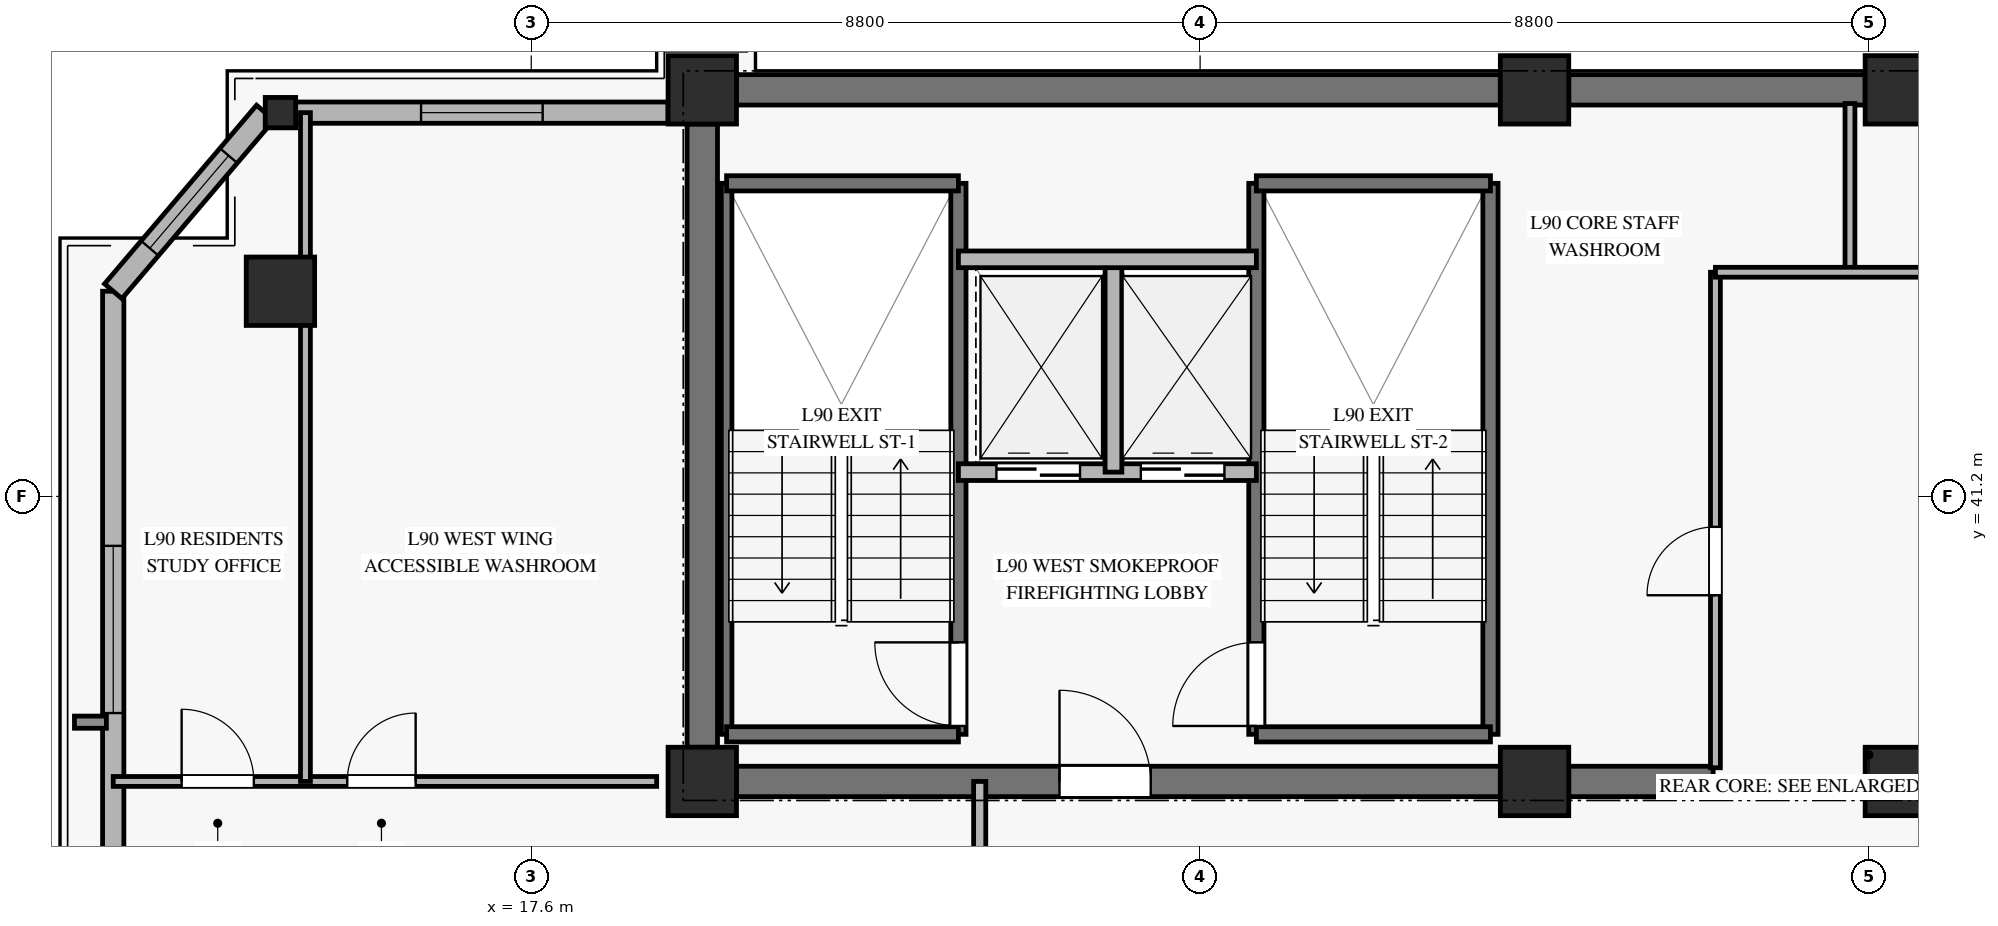
"""IFC4 building model, lengths in metres.
Left out: names, types, materials, properties, quantities, classifications, styles, units other than length and angle.
Written with IfcOpenShell. Run it as: python <this file> out.ifc"""

import sys

from ifc_helpers import new_model, si_unit, direction, frame, frame_2d, origin, origin_2d, place, context, subcontext, project, spatial, rectangle, hollow_rectangle, extrude, source, transform, mapped, element, fill, save


model = new_model("IFC4")
c1 = context("Model", 3, precision=1e-05, world=origin(), true_north=direction((0.0, 1.0)))
c2 = subcontext(c1, "Body", "Model", "MODEL_VIEW")
j1 = project(units=[si_unit("LENGTHUNIT", "METRE"), si_unit("PLANEANGLEUNIT", "RADIAN")], contexts=[c1])
p1 = place(None, origin())
s1 = spatial("IfcSite", under=j1, at=p1, CompositionType="ELEMENT")
p2 = place(p1, origin())
s2 = spatial("IfcBuilding", under=s1, at=p2, CompositionType="ELEMENT")
p3 = place(p2, frame((0.0, 0.0, 345.9)))
s3 = spatial("IfcBuildingStorey", under=s2, at=p3, CompositionType="ELEMENT", Elevation=345.9)
m1 = source(origin(), c2, "Body", "SweptSolid", [
    extrude(rectangle(XDim=0.9, YDim=0.9, at=origin_2d()), origin(), (0.0, 0.0, 1.0), 3.185),
])
for number, where, z_axis, x_axis in (
    (1, (19.85, 37.45, 0.0), (0.0, 0.0, 1.0), (1.0, 0.0, 0.0)),
    (2, (19.85, 46.55, 0.0), (0.0, 0.0, 1.0), (1.0, 0.0, 0.0)),
    (3, (30.8, 37.45, 0.0), (0.0, 0.0, 1.0), (1.0, 0.0, 0.0)),
    (4, (30.8, 46.55, 0.0), (0.0, 0.0, 1.0), (1.0, 0.0, 0.0)),
    (5, (35.6, 37.45, 0.0), (0.0, 0.0, 1.0), (1.0, 0.0, 0.0)),
    (6, (35.6, 46.55, 0.0), (0.0, 0.0, 1.0), (1.0, 0.0, 0.0)),
):
    element("IfcColumn", number, at=place(p3, frame(where, z_axis=z_axis, x_axis=x_axis)), inside=s3, PredefinedType="PILASTER", context=c2, shape_type="MappedRepresentation", body=[
        mapped(m1, transform((0.0, 0.0, 0.0), x_axis=(1.0, 0.0, 0.0), y_axis=(0.0, 1.0, 0.0), z_axis=(0.0, 0.0, 1.0), scale=1.0)),
    ])
p4 = place(p3, frame((20.3, 46.55, 0.0), z_axis=(0.0, 0.0, 1.0), x_axis=(1.0, 0.0, 0.0)))
e7 = element("IfcWall", 7, at=p4, inside=s3, PredefinedType="SHEAR", context=c2, shape_type="SweptSolid", body=[
    extrude(rectangle(XDim=10.05, YDim=0.4, at=frame_2d((5.025, 0.0))), origin(), (0.0, 0.0, 1.0), 3.185),
])
p5 = place(p3, frame((31.25, 46.55, 0.0), z_axis=(0.0, 0.0, 1.0), x_axis=(1.0, 0.0, 0.0)))
e8 = element("IfcWall", 8, at=p5, inside=s3, PredefinedType="SHEAR", context=c2, shape_type="SweptSolid", body=[
    extrude(rectangle(XDim=3.9, YDim=0.4, at=frame_2d((1.95, 0.0))), origin(), (0.0, 0.0, 1.0), 3.185),
])
p6 = place(p3, frame((20.3, 37.45, 0.0), z_axis=(0.0, 0.0, 1.0), x_axis=(1.0, 0.0, 0.0)))
e9 = element("IfcWall", 9, at=p6, inside=s3, PredefinedType="SHEAR", context=c2, shape_type="SweptSolid", body=[
    extrude(rectangle(XDim=10.05, YDim=0.4, at=frame_2d((5.025, 0.0))), origin(), (0.0, 0.0, 1.0), 3.185),
])
p7 = place(p6, frame((4.25, 0.0, 0.0)))
e10 = element("IfcOpeningElement", 10, at=p7, cuts=e9, PredefinedType="OPENING", context=c2, shape_type="SweptSolid", body=[
    extrude(rectangle(XDim=1.2, YDim=2.15, at=frame_2d((0.6, 1.075))), frame((0.0, 0.21, 0.0), z_axis=(0.0, -1.0, 0.0), x_axis=(1.0, 0.0, 0.0)), (0.0, 0.0, 1.0), 0.42),
])
p8 = place(p3, frame((31.25, 37.45, 0.0), z_axis=(0.0, 0.0, 1.0), x_axis=(1.0, 0.0, 0.0)))
e11 = element("IfcWall", 11, at=p8, inside=s3, PredefinedType="SHEAR", context=c2, shape_type="SweptSolid", body=[
    extrude(rectangle(XDim=1.9, YDim=0.4, at=frame_2d((0.95, 0.0))), origin(), (0.0, 0.0, 1.0), 3.185),
])
p9 = place(p3, frame((19.85, 37.9, 0.0), z_axis=(0.0, 0.0, 1.0), x_axis=(0.0, 1.0, 0.0)))
e12 = element("IfcWall", 12, at=p9, inside=s3, PredefinedType="SHEAR", context=c2, shape_type="SweptSolid", body=[
    extrude(rectangle(XDim=8.2, YDim=0.4, at=frame_2d((4.1, 0.0))), origin(), (0.0, 0.0, 1.0), 3.185),
])
m2 = source(origin(), c2, "Body", "SweptSolid", [
    extrude(hollow_rectangle(XDim=0.9, YDim=0.9, WallThickness=0.04, at=origin_2d()), origin(), (0.0, 0.0, 1.0), 3.185),
])
p10 = place(p3, frame((14.3, 43.9, 0.0), z_axis=(0.0, 0.0, 1.0), x_axis=(1.0, 0.0, 0.0)))
e13 = element("IfcColumn", 13, at=p10, inside=s3, PredefinedType="COLUMN", context=c2, shape_type="MappedRepresentation", body=[
    mapped(m2, transform((0.0, 0.0, 0.0), x_axis=(1.0, 0.0, 0.0), y_axis=(0.0, 1.0, 0.0), z_axis=(0.0, 0.0, 1.0), scale=1.0)),
])
m3 = source(origin(), c2, "Body", "SweptSolid", [
    extrude(hollow_rectangle(XDim=0.4, YDim=0.4, WallThickness=0.02, at=origin_2d()), origin(), (0.0, 0.0, 1.0), 3.185),
])
p11 = place(p3, frame((14.3, 46.25, 0.0), z_axis=(0.0, 0.0, 1.0), x_axis=(1.0, 0.0, 0.0)))
e14 = element("IfcColumn", 14, at=p11, inside=s3, PredefinedType="COLUMN", context=c2, shape_type="MappedRepresentation", body=[
    mapped(m3, transform((0.0, 0.0, 0.0), x_axis=(1.0, 0.0, 0.0), y_axis=(0.0, 1.0, 0.0), z_axis=(0.0, 0.0, 1.0), scale=1.0)),
])
p12 = place(p3, frame((12.1, 35.0, 0.0), z_axis=(0.0, 0.0, 1.0), x_axis=(0.0, 1.0, 0.0)))
e15 = element("IfcWall", 15, at=p12, inside=s3, PredefinedType="SOLIDWALL", context=c2, shape_type="SweptSolid", body=[
    extrude(rectangle(XDim=8.9, YDim=0.28, at=frame_2d((4.45, 0.0))), origin(), (0.0, 0.0, 1.0), 2.815),
])
p13 = place(p12, frame((3.35, 0.0, 0.45)))
e16 = element("IfcOpeningElement", 16, at=p13, cuts=e15, PredefinedType="OPENING", context=c2, shape_type="SweptSolid", body=[
    extrude(rectangle(XDim=2.2, YDim=2.1, at=frame_2d((1.1, 1.05))), frame((0.0, 0.15, 0.0), z_axis=(0.0, -1.0, 0.0), x_axis=(1.0, 0.0, 0.0)), (0.0, 0.0, 1.0), 0.3),
])
p14 = place(p3, frame((14.5, 46.25, 0.0), z_axis=(0.0, 0.0, 1.0), x_axis=(1.0, 0.0, 0.0)))
e17 = element("IfcWall", 17, at=p14, inside=s3, PredefinedType="SOLIDWALL", context=c2, shape_type="SweptSolid", body=[
    extrude(rectangle(XDim=4.9, YDim=0.28, at=frame_2d((2.45, 0.0))), origin(), (0.0, 0.0, 1.0), 2.815),
])
p15 = place(p14, frame((1.65, 0.0, 0.45)))
e18 = element("IfcOpeningElement", 18, at=p15, cuts=e17, PredefinedType="OPENING", context=c2, shape_type="SweptSolid", body=[
    extrude(rectangle(XDim=1.6, YDim=2.0, at=frame_2d((0.8, 1.0))), frame((0.0, 0.15, 0.0), z_axis=(0.0, -1.0, 0.0), x_axis=(1.0, 0.0, 0.0)), (0.0, 0.0, 1.0), 0.3),
])
p16 = place(p3, frame((14.1, 46.25, 0.0), z_axis=(0.0, 0.0, 1.0), x_axis=(-0.648103010114, -0.761552682538, 0.0)))
e19 = element("IfcWall", 19, at=p16, inside=s3, PredefinedType="SOLIDWALL", context=c2, shape_type="SweptSolid", body=[
    extrude(rectangle(XDim=3.086, YDim=0.3, at=frame_2d((1.543, 0.0))), origin(), (0.0, 0.0, 1.0), 2.815),
])
p17 = place(p16, frame((0.743, 0.0, 0.45)))
e20 = element("IfcOpeningElement", 20, at=p17, cuts=e19, PredefinedType="OPENING", context=c2, shape_type="SweptSolid", body=[
    extrude(rectangle(XDim=1.6, YDim=2.0, at=frame_2d((0.8, 1.0))), frame((0.0, 0.16, 0.0), z_axis=(0.0, -1.0, 0.0), x_axis=(1.0, 0.0, 0.0)), (0.0, 0.0, 1.0), 0.32),
])
p18 = place(p3, frame((20.17, 38.07, 0.0), z_axis=(0.0, 0.0, 1.0), x_axis=(0.0, 1.0, 0.0)))
e21 = element("IfcWall", 21, at=p18, inside=s3, PredefinedType="SOLIDWALL", context=c2, shape_type="SweptSolid", body=[
    extrude(rectangle(XDim=7.25, YDim=0.14, at=frame_2d((3.625, 0.0))), origin(), (0.0, 0.0, 1.0), 3.4),
])
p19 = place(p3, frame((23.22, 38.07, 0.0), z_axis=(0.0, 0.0, 1.0), x_axis=(0.0, 1.0, 0.0)))
e22 = element("IfcWall", 22, at=p19, inside=s3, PredefinedType="SOLIDWALL", context=c2, shape_type="SweptSolid", body=[
    extrude(rectangle(XDim=7.25, YDim=0.2, at=frame_2d((3.625, 0.0))), origin(), (0.0, 0.0, 1.0), 3.4),
])
p20 = place(p19, frame((0.11, 0.0, 0.0)))
e23 = element("IfcOpeningElement", 23, at=p20, cuts=e22, PredefinedType="OPENING", context=c2, shape_type="SweptSolid", body=[
    extrude(rectangle(XDim=1.1, YDim=2.15, at=frame_2d((0.55, 1.075))), frame((0.0, 0.11, 0.0), z_axis=(0.0, -1.0, 0.0), x_axis=(1.0, 0.0, 0.0)), (0.0, 0.0, 1.0), 0.22),
])
for number, where, z_axis, x_axis in (
    (24, (20.17, 45.32, 0.0), (0.0, 0.0, 1.0), (1.0, 0.0, 0.0)),
    (25, (20.17, 38.07, 0.0), (0.0, 0.0, 1.0), (1.0, 0.0, 0.0)),
):
    element("IfcWall", number, at=place(p3, frame(where, z_axis=z_axis, x_axis=x_axis)), inside=s3, PredefinedType="SOLIDWALL", context=c2, shape_type="SweptSolid", body=[
        extrude(rectangle(XDim=3.05, YDim=0.2, at=frame_2d((1.525, 0.0))), origin(), (0.0, 0.0, 1.0), 3.4),
    ])
p21 = place(p3, frame((27.14, 38.07, 0.0), z_axis=(0.0, 0.0, 1.0), x_axis=(0.0, 1.0, 0.0)))
e26 = element("IfcWall", 26, at=p21, inside=s3, PredefinedType="SOLIDWALL", context=c2, shape_type="SweptSolid", body=[
    extrude(rectangle(XDim=7.25, YDim=0.2, at=frame_2d((3.625, 0.0))), origin(), (0.0, 0.0, 1.0), 3.4),
])
p22 = place(p21, frame((0.11, 0.0, 0.0)))
e27 = element("IfcOpeningElement", 27, at=p22, cuts=e26, PredefinedType="OPENING", context=c2, shape_type="SweptSolid", body=[
    extrude(rectangle(XDim=1.1, YDim=2.15, at=frame_2d((0.55, 1.075))), frame((0.0, 0.11, 0.0), z_axis=(0.0, -1.0, 0.0), x_axis=(1.0, 0.0, 0.0)), (0.0, 0.0, 1.0), 0.22),
])
p23 = place(p3, frame((30.22, 38.07, 0.0), z_axis=(0.0, 0.0, 1.0), x_axis=(0.0, 1.0, 0.0)))
e28 = element("IfcWall", 28, at=p23, inside=s3, PredefinedType="SOLIDWALL", context=c2, shape_type="SweptSolid", body=[
    extrude(rectangle(XDim=7.25, YDim=0.2, at=frame_2d((3.625, 0.0))), origin(), (0.0, 0.0, 1.0), 3.4),
])
for number, where, z_axis, x_axis in (
    (29, (27.14, 45.32, 0.0), (0.0, 0.0, 1.0), (1.0, 0.0, 0.0)),
    (30, (27.14, 38.07, 0.0), (0.0, 0.0, 1.0), (1.0, 0.0, 0.0)),
):
    element("IfcWall", number, at=place(p3, frame(where, z_axis=z_axis, x_axis=x_axis)), inside=s3, PredefinedType="SOLIDWALL", context=c2, shape_type="SweptSolid", body=[
        extrude(rectangle(XDim=3.08, YDim=0.2, at=frame_2d((1.54, 0.0))), origin(), (0.0, 0.0, 1.0), 3.4),
    ])
p24 = place(p3, frame((23.22, 41.52, 0.0), z_axis=(0.0, 0.0, 1.0), x_axis=(1.0, 0.0, 0.0)))
e31 = element("IfcWall", 31, at=p24, inside=s3, PredefinedType="SOLIDWALL", context=c2, shape_type="SweptSolid", body=[
    extrude(rectangle(XDim=3.92, YDim=0.22, at=frame_2d((1.96, 0.0))), origin(), (0.0, 0.0, 1.0), 3.185),
])
p25 = place(p24, frame((0.5, 0.0, 0.0)))
e32 = element("IfcOpeningElement", 32, at=p25, cuts=e31, PredefinedType="OPENING", context=c2, shape_type="SweptSolid", body=[
    extrude(rectangle(XDim=1.1, YDim=2.2, at=frame_2d((0.55, 1.1))), frame((0.0, 0.12, 0.0), z_axis=(0.0, -1.0, 0.0), x_axis=(1.0, 0.0, 0.0)), (0.0, 0.0, 1.0), 0.24),
])
p26 = place(p24, frame((2.4, 0.0, 0.0)))
e33 = element("IfcOpeningElement", 33, at=p26, cuts=e31, PredefinedType="OPENING", context=c2, shape_type="SweptSolid", body=[
    extrude(rectangle(XDim=1.1, YDim=2.2, at=frame_2d((0.55, 1.1))), frame((0.0, 0.12, 0.0), z_axis=(0.0, -1.0, 0.0), x_axis=(1.0, 0.0, 0.0)), (0.0, 0.0, 1.0), 0.24),
])
p27 = place(p3, frame((25.26, 41.52, 0.0), z_axis=(0.0, 0.0, 1.0), x_axis=(0.0, 1.0, 0.0)))
e34 = element("IfcWall", 34, at=p27, inside=s3, PredefinedType="SOLIDWALL", context=c2, shape_type="SweptSolid", body=[
    extrude(rectangle(XDim=2.8, YDim=0.22, at=frame_2d((1.4, 0.0))), origin(), (0.0, 0.0, 1.0), 3.185),
])
p28 = place(p3, frame((23.22, 44.32, 0.0), z_axis=(0.0, 0.0, 1.0), x_axis=(1.0, 0.0, 0.0)))
e35 = element("IfcWall", 35, at=p28, inside=s3, PredefinedType="SOLIDWALL", context=c2, shape_type="SweptSolid", body=[
    extrude(rectangle(XDim=3.92, YDim=0.22, at=frame_2d((1.96, 0.0))), origin(), (0.0, 0.0, 1.0), 3.185),
])
p29 = place(p3, frame((33.18, 37.63, 0.0), z_axis=(0.0, 0.0, 1.0), x_axis=(0.0, 1.0, 0.0)))
e36 = element("IfcWall", 36, at=p29, inside=s3, PredefinedType="PARTITIONING", context=c2, shape_type="SweptSolid", body=[
    extrude(rectangle(XDim=6.52, YDim=0.13, at=frame_2d((3.26, 0.0))), origin(), (0.0, 0.0, 1.0), 2.27),
])
p30 = place(p29, frame((2.27, 0.0, 0.0)))
e37 = element("IfcOpeningElement", 37, at=p30, cuts=e36, PredefinedType="OPENING", context=c2, shape_type="SweptSolid", body=[
    extrude(rectangle(XDim=0.9, YDim=2.1, at=frame_2d((0.45, 1.05))), frame((0.0, 0.075, 0.0), z_axis=(0.0, -1.0, 0.0), x_axis=(1.0, 0.0, 0.0)), (0.0, 0.0, 1.0), 0.15),
])
p31 = place(p3, frame((34.95, 44.15, 0.0), z_axis=(0.0, 0.0, 1.0), x_axis=(0.0, 1.0, 0.0)))
e38 = element("IfcWall", 38, at=p31, inside=s3, PredefinedType="PARTITIONING", context=c2, shape_type="SweptSolid", body=[
    extrude(rectangle(XDim=2.22, YDim=0.13, at=frame_2d((1.11, 0.0))), origin(), (0.0, 0.0, 1.0), 3.185),
])
p32 = place(p3, frame((33.18, 44.15, 0.0), z_axis=(0.0, 0.0, 1.0), x_axis=(1.0, 0.0, 0.0)))
e39 = element("IfcWall", 39, at=p32, inside=s3, PredefinedType="PARTITIONING", context=c2, shape_type="SweptSolid", body=[
    extrude(rectangle(XDim=2.94, YDim=0.13, at=frame_2d((1.47, 0.0))), origin(), (0.0, 0.0, 1.0), 2.47),
])
p33 = place(p3, frame((23.5, 23.5, 0.0), z_axis=(0.0, 0.0, 1.0), x_axis=(0.0, 1.0, 0.0)))
e40 = element("IfcWall", 40, at=p33, inside=s3, PredefinedType="PARTITIONING", context=c2, shape_type="SweptSolid", body=[
    extrude(rectangle(XDim=13.95, YDim=0.16, at=frame_2d((6.975, 0.0))), origin(), (0.0, 0.0, 1.0), 2.77),
])
p34 = place(p33, frame((11.42, 0.0, 0.0)))
e41 = element("IfcOpeningElement", 41, at=p34, cuts=e40, PredefinedType="OPENING", context=c2, shape_type="SweptSolid", body=[
    extrude(rectangle(XDim=1.05, YDim=2.15, at=frame_2d((0.525, 1.075))), frame((0.0, 0.09, 0.0), z_axis=(0.0, -1.0, 0.0), x_axis=(1.0, 0.0, 0.0)), (0.0, 0.0, 1.0), 0.18),
])
p35 = place(p3, frame((12.1, 37.45, 0.0), z_axis=(0.0, 0.0, 1.0), x_axis=(1.0, 0.0, 0.0)))
e42 = element("IfcWall", 42, at=p35, inside=s3, PredefinedType="PARTITIONING", context=c2, shape_type="SweptSolid", body=[
    extrude(rectangle(XDim=7.15, YDim=0.13, at=frame_2d((3.575, 0.0))), origin(), (0.0, 0.0, 1.0), 2.82),
])
p36 = place(p35, frame((0.9, 0.0, 0.0)))
e43 = element("IfcOpeningElement", 43, at=p36, cuts=e42, PredefinedType="OPENING", context=c2, shape_type="SweptSolid", body=[
    extrude(rectangle(XDim=0.95, YDim=2.1, at=frame_2d((0.475, 1.05))), frame((0.0, 0.075, 0.0), z_axis=(0.0, -1.0, 0.0), x_axis=(1.0, 0.0, 0.0)), (0.0, 0.0, 1.0), 0.15),
])
p37 = place(p35, frame((3.079, 0.0, 0.0)))
e44 = element("IfcOpeningElement", 44, at=p37, cuts=e42, PredefinedType="OPENING", context=c2, shape_type="SweptSolid", body=[
    extrude(rectangle(XDim=0.9, YDim=2.1, at=frame_2d((0.45, 1.05))), frame((0.0, 0.075, 0.0), z_axis=(0.0, -1.0, 0.0), x_axis=(1.0, 0.0, 0.0)), (0.0, 0.0, 1.0), 0.15),
])
p38 = place(p3, frame((14.629, 37.45, 0.0), z_axis=(0.0, 0.0, 1.0), x_axis=(0.0, 1.0, 0.0)))
e45 = element("IfcWall", 45, at=p38, inside=s3, PredefinedType="PARTITIONING", context=c2, shape_type="SweptSolid", body=[
    extrude(rectangle(XDim=8.8, YDim=0.13, at=frame_2d((4.4, 0.0))), origin(), (0.0, 0.0, 1.0), 2.82),
])
m4 = source(origin(), c2, "Body", "SweptSolid", [
    extrude(rectangle(XDim=2.2, YDim=2.1, at=frame_2d((1.1, 1.05))), frame((0.0, 0.03, 0.0), z_axis=(0.0, -1.0, 0.0), x_axis=(1.0, 0.0, 0.0)), (0.0, 0.0, 1.0), 0.06),
])
p39 = place(p13, origin())
e46 = element("IfcWindow", 46, at=p39, inside=s3, PartitioningType="SINGLE_PANEL", PredefinedType="WINDOW", context=c2, shape_type="MappedRepresentation", body=[
    mapped(m4, transform((0.0, 0.0, 0.0), x_axis=(1.0, 0.0, 0.0), y_axis=(0.0, 1.0, 0.0), z_axis=(0.0, 0.0, 1.0), scale=1.0)),
])
fill(e16, e46)
m5 = source(origin(), c2, "Body", "SweptSolid", [
    extrude(rectangle(XDim=1.6, YDim=2.0, at=frame_2d((0.8, 1.0))), frame((0.0, 0.03, 0.0), z_axis=(0.0, -1.0, 0.0), x_axis=(1.0, 0.0, 0.0)), (0.0, 0.0, 1.0), 0.06),
])
p40 = place(p15, origin())
e47 = element("IfcWindow", 47, at=p40, inside=s3, PartitioningType="SINGLE_PANEL", PredefinedType="WINDOW", context=c2, shape_type="MappedRepresentation", body=[
    mapped(m5, transform((0.0, 0.0, 0.0), x_axis=(1.0, 0.0, 0.0), y_axis=(0.0, 1.0, 0.0), z_axis=(0.0, 0.0, 1.0), scale=1.0)),
])
fill(e18, e47)
p41 = place(p17, origin())
e48 = element("IfcWindow", 48, at=p41, inside=s3, PartitioningType="SINGLE_PANEL", PredefinedType="WINDOW", context=c2, shape_type="MappedRepresentation", body=[
    mapped(m5, transform((0.0, 0.0, 0.0), x_axis=(1.0, 0.0, 0.0), y_axis=(0.0, 1.0, 0.0), z_axis=(0.0, 0.0, 1.0), scale=1.0)),
])
fill(e20, e48)
m6 = source(origin(), c2, "Body", "SweptSolid", [
    extrude(rectangle(XDim=1.1, YDim=2.15, at=frame_2d((0.55, 1.075))), frame((0.0, 0.025, 0.0), z_axis=(0.0, -1.0, 0.0), x_axis=(1.0, 0.0, 0.0)), (0.0, 0.0, 1.0), 0.05),
])
p42 = place(p20, origin())
e49 = element("IfcDoor", 49, at=p42, inside=s3, OperationType="SINGLE_SWING_RIGHT", PredefinedType="DOOR", context=c2, shape_type="MappedRepresentation", body=[
    mapped(m6, transform((0.0, 0.0, 0.0), x_axis=(1.0, 0.0, 0.0), y_axis=(0.0, 1.0, 0.0), z_axis=(0.0, 0.0, 1.0), scale=1.0)),
])
fill(e23, e49)
p43 = place(p22, origin())
e50 = element("IfcDoor", 50, at=p43, inside=s3, OperationType="SINGLE_SWING_LEFT", PredefinedType="DOOR", context=c2, shape_type="MappedRepresentation", body=[
    mapped(m6, transform((0.0, 0.0, 0.0), x_axis=(1.0, 0.0, 0.0), y_axis=(0.0, 1.0, 0.0), z_axis=(0.0, 0.0, 1.0), scale=1.0)),
])
fill(e27, e50)
m7 = source(origin(), c2, "Body", "SweptSolid", [
    extrude(rectangle(XDim=1.1, YDim=2.2, at=frame_2d((0.55, 1.1))), frame((0.0, 0.025, 0.0), z_axis=(0.0, -1.0, 0.0), x_axis=(1.0, 0.0, 0.0)), (0.0, 0.0, 1.0), 0.05),
])
p44 = place(p25, origin())
e51 = element("IfcDoor", 51, at=p44, inside=s3, OperationType="SLIDING_TO_LEFT", PredefinedType="DOOR", context=c2, shape_type="MappedRepresentation", body=[
    mapped(m7, transform((0.0, 0.0, 0.0), x_axis=(1.0, 0.0, 0.0), y_axis=(0.0, 1.0, 0.0), z_axis=(0.0, 0.0, 1.0), scale=1.0)),
])
fill(e32, e51)
p45 = place(p26, origin())
e52 = element("IfcDoor", 52, at=p45, inside=s3, OperationType="SLIDING_TO_LEFT", PredefinedType="DOOR", context=c2, shape_type="MappedRepresentation", body=[
    mapped(m7, transform((0.0, 0.0, 0.0), x_axis=(1.0, 0.0, 0.0), y_axis=(0.0, 1.0, 0.0), z_axis=(0.0, 0.0, 1.0), scale=1.0)),
])
fill(e33, e52)
m8 = source(origin(), c2, "Body", "SweptSolid", [
    extrude(rectangle(XDim=1.2, YDim=2.15, at=frame_2d((0.6, 1.075))), frame((0.0, 0.025, 0.0), z_axis=(0.0, -1.0, 0.0), x_axis=(1.0, 0.0, 0.0)), (0.0, 0.0, 1.0), 0.05),
])
p46 = place(p7, origin())
e53 = element("IfcDoor", 53, at=p46, inside=s3, OperationType="SINGLE_SWING_LEFT", PredefinedType="DOOR", context=c2, shape_type="MappedRepresentation", body=[
    mapped(m8, transform((0.0, 0.0, 0.0), x_axis=(1.0, 0.0, 0.0), y_axis=(0.0, 1.0, 0.0), z_axis=(0.0, 0.0, 1.0), scale=1.0)),
])
fill(e10, e53)
m9 = source(origin(), c2, "Body", "SweptSolid", [
    extrude(rectangle(XDim=0.9, YDim=2.1, at=frame_2d((0.45, 1.05))), frame((0.0, 0.025, 0.0), z_axis=(0.0, -1.0, 0.0), x_axis=(1.0, 0.0, 0.0)), (0.0, 0.0, 1.0), 0.05),
])
p47 = place(p30, origin())
e54 = element("IfcDoor", 54, at=p47, inside=s3, OperationType="SINGLE_SWING_LEFT", PredefinedType="DOOR", context=c2, shape_type="MappedRepresentation", body=[
    mapped(m9, transform((0.0, 0.0, 0.0), x_axis=(1.0, 0.0, 0.0), y_axis=(0.0, 1.0, 0.0), z_axis=(0.0, 0.0, 1.0), scale=1.0)),
])
fill(e37, e54)
m10 = source(origin(), c2, "Body", "SweptSolid", [
    extrude(rectangle(XDim=0.95, YDim=2.1, at=frame_2d((0.475, 1.05))), frame((0.0, 0.025, 0.0), z_axis=(0.0, -1.0, 0.0), x_axis=(1.0, 0.0, 0.0)), (0.0, 0.0, 1.0), 0.05),
])
p48 = place(p36, origin())
e55 = element("IfcDoor", 55, at=p48, inside=s3, OperationType="SINGLE_SWING_LEFT", PredefinedType="DOOR", context=c2, shape_type="MappedRepresentation", body=[
    mapped(m10, transform((0.0, 0.0, 0.0), x_axis=(1.0, 0.0, 0.0), y_axis=(0.0, 1.0, 0.0), z_axis=(0.0, 0.0, 1.0), scale=1.0)),
])
fill(e43, e55)
p49 = place(p37, origin())
e56 = element("IfcDoor", 56, at=p49, inside=s3, OperationType="SINGLE_SWING_RIGHT", PredefinedType="DOOR", context=c2, shape_type="MappedRepresentation", body=[
    mapped(m9, transform((0.0, 0.0, 0.0), x_axis=(1.0, 0.0, 0.0), y_axis=(0.0, 1.0, 0.0), z_axis=(0.0, 0.0, 1.0), scale=1.0)),
])
fill(e44, e56)
save(model, sys.argv[1])
